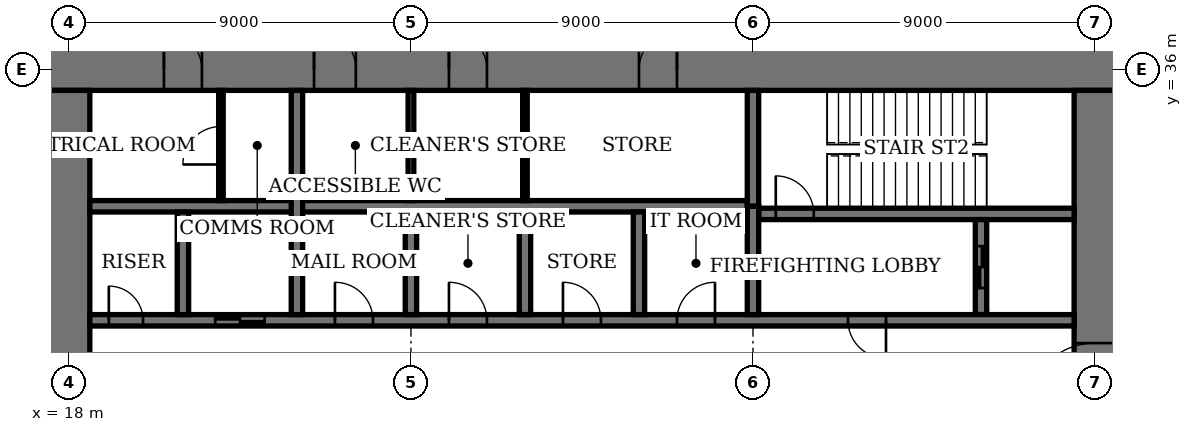
"""IFC4 building model, lengths in metres.
Left out: names, types, materials, properties, quantities, classifications, styles, units other than length and angle.
Written with IfcOpenShell. Run it as: python <this file> out.ifc"""

import sys

from ifc_helpers import new_model, si_unit, direction, frame, frame_2d, origin, place, context, subcontext, project, spatial, rectangle, extrude, element, fill, save


model = new_model("IFC4")
c1 = context("Model", 3, precision=1e-05, world=origin(), true_north=direction((0.0, 1.0)))
c2 = subcontext(c1, "Body", "Model", "MODEL_VIEW")
j1 = project(units=[si_unit("LENGTHUNIT", "METRE"), si_unit("PLANEANGLEUNIT", "RADIAN")], contexts=[c1])
p1 = place(None, origin())
s1 = spatial("IfcSite", under=j1, at=p1, CompositionType="ELEMENT")
p2 = place(p1, origin())
s2 = spatial("IfcBuilding", under=s1, at=p2, CompositionType="ELEMENT")
p3 = place(p2, frame((0.0, 0.0, 307.4)))
s3 = spatial("IfcBuildingStorey", under=s2, at=p3, CompositionType="ELEMENT", Elevation=307.4)
p4 = place(p3, frame((45.55, 36.0, 0.0), z_axis=(0.0, 0.0, 1.0), x_axis=(-1.0, 0.0, 0.0)))
e1 = element("IfcWall", 1, at=p4, inside=s3, PredefinedType="SHEAR", context=c2, shape_type="SweptSolid", body=[
    extrude(rectangle(XDim=28.1, YDim=1.1, at=frame_2d((14.05, 0.0))), origin(), (0.0, 0.0, 1.0), 4.4),
])
p5 = place(p4, frame((11.55, 0.0, 0.0)))
e2 = element("IfcOpeningElement", 2, at=p5, cuts=e1, PredefinedType="OPENING", context=c2, shape_type="SweptSolid", body=[
    extrude(rectangle(XDim=1.0, YDim=2.4, at=frame_2d((0.5, 1.2))), frame((0.0, 0.56, 0.0), z_axis=(0.0, -1.0, 0.0), x_axis=(1.0, 0.0, 0.0)), (0.0, 0.0, 1.0), 1.12),
])
p6 = place(p4, frame((16.55, 0.0, 0.0)))
e3 = element("IfcOpeningElement", 3, at=p6, cuts=e1, PredefinedType="OPENING", context=c2, shape_type="SweptSolid", body=[
    extrude(rectangle(XDim=1.0, YDim=2.4, at=frame_2d((0.5, 1.2))), frame((0.0, 0.56, 0.0), z_axis=(0.0, -1.0, 0.0), x_axis=(1.0, 0.0, 0.0)), (0.0, 0.0, 1.0), 1.12),
])
p7 = place(p4, frame((20.0, 0.0, 0.0)))
e4 = element("IfcOpeningElement", 4, at=p7, cuts=e1, PredefinedType="OPENING", context=c2, shape_type="SweptSolid", body=[
    extrude(rectangle(XDim=1.1, YDim=2.4, at=frame_2d((0.55, 1.2))), frame((0.0, 0.56, 0.0), z_axis=(0.0, -1.0, 0.0), x_axis=(1.0, 0.0, 0.0)), (0.0, 0.0, 1.0), 1.12),
])
p8 = place(p4, frame((24.05, 0.0, 0.0)))
e5 = element("IfcOpeningElement", 5, at=p8, cuts=e1, PredefinedType="OPENING", context=c2, shape_type="SweptSolid", body=[
    extrude(rectangle(XDim=1.0, YDim=2.4, at=frame_2d((0.5, 1.2))), frame((0.0, 0.56, 0.0), z_axis=(0.0, -1.0, 0.0), x_axis=(1.0, 0.0, 0.0)), (0.0, 0.0, 1.0), 1.12),
])
p9 = place(p3, frame((18.0, 35.45, 0.0), z_axis=(0.0, 0.0, 1.0), x_axis=(0.0, -1.0, 0.0)))
e6 = element("IfcWall", 6, at=p9, inside=s3, PredefinedType="SHEAR", context=c2, shape_type="SweptSolid", body=[
    extrude(rectangle(XDim=16.9, YDim=1.1, at=frame_2d((8.45, 0.0))), origin(), (0.0, 0.0, 1.0), 4.4),
])
p10 = place(p9, frame((8.45, 0.0, 0.0)))
e7 = element("IfcOpeningElement", 7, at=p10, cuts=e6, PredefinedType="OPENING", context=c2, shape_type="SweptSolid", body=[
    extrude(rectangle(XDim=1.8, YDim=2.4, at=frame_2d((0.9, 1.2))), frame((0.0, 0.56, 0.0), z_axis=(0.0, -1.0, 0.0), x_axis=(1.0, 0.0, 0.0)), (0.0, 0.0, 1.0), 1.12),
])
p11 = place(p3, frame((45.0, 18.55, 0.0), z_axis=(0.0, 0.0, 1.0), x_axis=(0.0, 1.0, 0.0)))
e8 = element("IfcWall", 8, at=p11, inside=s3, PredefinedType="SHEAR", context=c2, shape_type="SweptSolid", body=[
    extrude(rectangle(XDim=16.9, YDim=1.1, at=frame_2d((8.45, 0.0))), origin(), (0.0, 0.0, 1.0), 4.4),
])
p12 = place(p11, frame((8.45, 0.0, 0.0)))
e9 = element("IfcOpeningElement", 9, at=p12, cuts=e8, PredefinedType="OPENING", context=c2, shape_type="SweptSolid", body=[
    extrude(rectangle(XDim=1.8, YDim=2.4, at=frame_2d((0.9, 1.2))), frame((0.0, 0.56, 0.0), z_axis=(0.0, -1.0, 0.0), x_axis=(1.0, 0.0, 0.0)), (0.0, 0.0, 1.0), 1.12),
])
p13 = place(p3, frame((36.15, 32.2, 0.0), z_axis=(0.0, 0.0, 1.0), x_axis=(1.0, 0.0, 0.0)))
e10 = element("IfcWall", 10, at=p13, inside=s3, PredefinedType="SHEAR", context=c2, shape_type="SweptSolid", body=[
    extrude(rectangle(XDim=8.3, YDim=0.3, at=frame_2d((4.15, 0.0))), origin(), (0.0, 0.0, 1.0), 4.4),
])
p14 = place(p13, frame((0.45, 0.0, 0.0)))
e11 = element("IfcOpeningElement", 11, at=p14, cuts=e10, PredefinedType="OPENING", context=c2, shape_type="SweptSolid", body=[
    extrude(rectangle(XDim=1.0, YDim=2.4, at=frame_2d((0.5, 1.2))), frame((0.0, 0.16, 0.0), z_axis=(0.0, -1.0, 0.0), x_axis=(1.0, 0.0, 0.0)), (0.0, 0.0, 1.0), 0.32),
])
p15 = place(p3, frame((36.0, 32.4, 0.0), z_axis=(0.0, 0.0, 1.0), x_axis=(0.0, 1.0, 0.0)))
e12 = element("IfcWall", 12, at=p15, inside=s3, PredefinedType="SHEAR", context=c2, shape_type="SweptSolid", body=[
    extrude(rectangle(XDim=3.05, YDim=0.3, at=frame_2d((1.525, 0.0))), origin(), (0.0, 0.0, 1.0), 4.4),
])
p16 = place(p3, frame((42.0, 29.55, 0.0), z_axis=(0.0, 0.0, 1.0), x_axis=(0.0, 1.0, 0.0)))
e13 = element("IfcWall", 13, at=p16, inside=s3, PredefinedType="SHEAR", context=c2, shape_type="SweptSolid", body=[
    extrude(rectangle(XDim=2.5, YDim=0.3, at=frame_2d((1.25, 0.0))), origin(), (0.0, 0.0, 1.0), 4.4),
])
p17 = place(p16, frame((0.7, 0.0, 0.0)))
e14 = element("IfcOpeningElement", 14, at=p17, cuts=e13, PredefinedType="OPENING", context=c2, shape_type="SweptSolid", body=[
    extrude(rectangle(XDim=1.1, YDim=2.4, at=frame_2d((0.55, 1.2))), frame((0.0, 0.16, 0.0), z_axis=(0.0, -1.0, 0.0), x_axis=(1.0, 0.0, 0.0)), (0.0, 0.0, 1.0), 0.32),
])
p18 = place(p3, frame((18.55, 29.4, 0.0), z_axis=(0.0, 0.0, 1.0), x_axis=(1.0, 0.0, 0.0)))
e15 = element("IfcWall", 15, at=p18, inside=s3, PredefinedType="SHEAR", context=c2, shape_type="SweptSolid", body=[
    extrude(rectangle(XDim=25.9, YDim=0.3, at=frame_2d((12.95, 0.0))), origin(), (0.0, 0.0, 1.0), 4.4),
])
p19 = place(p18, frame((19.95, 0.0, 0.0)))
e16 = element("IfcOpeningElement", 16, at=p19, cuts=e15, PredefinedType="OPENING", context=c2, shape_type="SweptSolid", body=[
    extrude(rectangle(XDim=1.0, YDim=2.4, at=frame_2d((0.5, 1.2))), frame((0.0, 0.16, 0.0), z_axis=(0.0, -1.0, 0.0), x_axis=(1.0, 0.0, 0.0)), (0.0, 0.0, 1.0), 0.32),
])
p20 = place(p18, frame((0.5, 0.0, 0.0)))
e17 = element("IfcOpeningElement", 17, at=p20, cuts=e15, PredefinedType="OPENING", context=c2, shape_type="SweptSolid", body=[
    extrude(rectangle(XDim=0.9, YDim=2.1, at=frame_2d((0.45, 1.05))), frame((0.0, 0.16, 0.0), z_axis=(0.0, -1.0, 0.0), x_axis=(1.0, 0.0, 0.0)), (0.0, 0.0, 1.0), 0.32),
])
p21 = place(p18, frame((15.45, 0.0, 0.0)))
e18 = element("IfcOpeningElement", 18, at=p21, cuts=e15, PredefinedType="OPENING", context=c2, shape_type="SweptSolid", body=[
    extrude(rectangle(XDim=1.0, YDim=2.4, at=frame_2d((0.5, 1.2))), frame((0.0, 0.16, 0.0), z_axis=(0.0, -1.0, 0.0), x_axis=(1.0, 0.0, 0.0)), (0.0, 0.0, 1.0), 0.32),
])
p22 = place(p18, frame((12.45, 0.0, 0.0)))
e19 = element("IfcOpeningElement", 19, at=p22, cuts=e15, PredefinedType="OPENING", context=c2, shape_type="SweptSolid", body=[
    extrude(rectangle(XDim=1.0, YDim=2.4, at=frame_2d((0.5, 1.2))), frame((0.0, 0.16, 0.0), z_axis=(0.0, -1.0, 0.0), x_axis=(1.0, 0.0, 0.0)), (0.0, 0.0, 1.0), 0.32),
])
p23 = place(p18, frame((9.45, 0.0, 0.0)))
e20 = element("IfcOpeningElement", 20, at=p23, cuts=e15, PredefinedType="OPENING", context=c2, shape_type="SweptSolid", body=[
    extrude(rectangle(XDim=1.0, YDim=2.4, at=frame_2d((0.5, 1.2))), frame((0.0, 0.16, 0.0), z_axis=(0.0, -1.0, 0.0), x_axis=(1.0, 0.0, 0.0)), (0.0, 0.0, 1.0), 0.32),
])
p24 = place(p18, frame((6.45, 0.0, 0.0)))
e21 = element("IfcOpeningElement", 21, at=p24, cuts=e15, PredefinedType="OPENING", context=c2, shape_type="SweptSolid", body=[
    extrude(rectangle(XDim=1.0, YDim=2.4, at=frame_2d((0.5, 1.2))), frame((0.0, 0.16, 0.0), z_axis=(0.0, -1.0, 0.0), x_axis=(1.0, 0.0, 0.0)), (0.0, 0.0, 1.0), 0.32),
])
p25 = place(p18, frame((3.3, 0.0, 0.0)))
e22 = element("IfcOpeningElement", 22, at=p25, cuts=e15, PredefinedType="OPENING", context=c2, shape_type="SweptSolid", body=[
    extrude(rectangle(XDim=1.3, YDim=2.4, at=frame_2d((0.65, 1.2))), frame((0.0, 0.16, 0.0), z_axis=(0.0, -1.0, 0.0), x_axis=(1.0, 0.0, 0.0)), (0.0, 0.0, 1.0), 0.32),
])
p26 = place(p3, frame((18.55, 32.4, 0.0), z_axis=(0.0, 0.0, 1.0), x_axis=(1.0, 0.0, 0.0)))
e23 = element("IfcWall", 23, at=p26, inside=s3, PredefinedType="SHEAR", context=c2, shape_type="SweptSolid", body=[
    extrude(rectangle(XDim=17.3, YDim=0.3, at=frame_2d((8.65, 0.0))), origin(), (0.0, 0.0, 1.0), 4.4),
])
for number, where, z_axis, x_axis in (
    (24, (33.0, 29.55, 0.0), (0.0, 0.0, 1.0), (0.0, 1.0, 0.0)),
    (25, (30.0, 29.55, 0.0), (0.0, 0.0, 1.0), (0.0, 1.0, 0.0)),
    (26, (27.0, 29.55, 0.0), (0.0, 0.0, 1.0), (0.0, 1.0, 0.0)),
):
    element("IfcWall", number, at=place(p3, frame(where, z_axis=z_axis, x_axis=x_axis)), inside=s3, PredefinedType="SHEAR", context=c2, shape_type="SweptSolid", body=[
        extrude(rectangle(XDim=2.7, YDim=0.3, at=frame_2d((1.35, 0.0))), origin(), (0.0, 0.0, 1.0), 4.4),
    ])
p27 = place(p3, frame((24.0, 29.55, 0.0), z_axis=(0.0, 0.0, 1.0), x_axis=(0.0, 1.0, 0.0)))
e27 = element("IfcWall", 27, at=p27, inside=s3, PredefinedType="SHEAR", context=c2, shape_type="SweptSolid", body=[
    extrude(rectangle(XDim=5.9, YDim=0.3, at=frame_2d((2.95, 0.0))), origin(), (0.0, 0.0, 1.0), 4.4),
])
p28 = place(p3, frame((21.0, 29.55, 0.0), z_axis=(0.0, 0.0, 1.0), x_axis=(0.0, 1.0, 0.0)))
e28 = element("IfcWall", 28, at=p28, inside=s3, PredefinedType="SHEAR", context=c2, shape_type="SweptSolid", body=[
    extrude(rectangle(XDim=2.7, YDim=0.3, at=frame_2d((1.35, 0.0))), origin(), (0.0, 0.0, 1.0), 4.4),
])
p29 = place(p3, frame((36.0, 29.55, 0.0), z_axis=(0.0, 0.0, 1.0), x_axis=(0.0, 1.0, 0.0)))
e29 = element("IfcWall", 29, at=p29, inside=s3, PredefinedType="SHEAR", context=c2, shape_type="SweptSolid", body=[
    extrude(rectangle(XDim=2.85, YDim=0.3, at=frame_2d((1.425, 0.0))), origin(), (0.0, 0.0, 1.0), 4.4),
])
p30 = place(p3, frame((30.0, 32.55, 0.0), z_axis=(0.0, 0.0, 1.0), x_axis=(0.0, 1.0, 0.0)))
e30 = element("IfcWall", 30, at=p30, inside=s3, PredefinedType="PARTITIONING", context=c2, shape_type="SweptSolid", body=[
    extrude(rectangle(XDim=2.9, YDim=0.12, at=frame_2d((1.45, 0.0))), origin(), (0.0, 0.0, 1.0), 4.05),
])
p31 = place(p3, frame((27.0, 32.55, 0.0), z_axis=(0.0, 0.0, 1.0), x_axis=(0.0, 1.0, 0.0)))
e31 = element("IfcWall", 31, at=p31, inside=s3, PredefinedType="PARTITIONING", context=c2, shape_type="SweptSolid", body=[
    extrude(rectangle(XDim=2.9, YDim=0.15, at=frame_2d((1.45, 0.0))), origin(), (0.0, 0.0, 1.0), 4.05),
])
p32 = place(p3, frame((22.0, 32.55, 0.0), z_axis=(0.0, 0.0, 1.0), x_axis=(0.0, 1.0, 0.0)))
e32 = element("IfcWall", 32, at=p32, inside=s3, PredefinedType="PARTITIONING", context=c2, shape_type="SweptSolid", body=[
    extrude(rectangle(XDim=2.9, YDim=0.12, at=frame_2d((1.45, 0.0))), origin(), (0.0, 0.0, 1.0), 4.05),
])
p33 = place(p32, frame((0.95, 0.0, 0.0)))
e33 = element("IfcOpeningElement", 33, at=p33, cuts=e32, PredefinedType="OPENING", context=c2, shape_type="SweptSolid", body=[
    extrude(rectangle(XDim=1.0, YDim=2.4, at=frame_2d((0.5, 1.2))), frame((0.0, 0.07, 0.0), z_axis=(0.0, -1.0, 0.0), x_axis=(1.0, 0.0, 0.0)), (0.0, 0.0, 1.0), 0.14),
])
p34 = place(p12, origin())
e34 = element("IfcDoor", 34, at=p34, inside=s3, OperationType="DOUBLE_DOOR_DOUBLE_SWING", PredefinedType="DOOR", context=c2, shape_type="SweptSolid", body=[
    extrude(rectangle(XDim=1.8, YDim=2.4, at=frame_2d((0.9, 1.2))), frame((0.0, 0.03, 0.0), z_axis=(0.0, -1.0, 0.0), x_axis=(1.0, 0.0, 0.0)), (0.0, 0.0, 1.0), 0.06),
    extrude(rectangle(XDim=0.04, YDim=2.4, at=frame_2d((0.02, 1.2))), frame((0.0, 0.55, 0.0), z_axis=(0.0, -1.0, 0.0), x_axis=(1.0, 0.0, 0.0)), (0.0, 0.0, 1.0), 1.1),
    extrude(rectangle(XDim=0.04, YDim=2.4, at=frame_2d((1.78, 1.2))), frame((0.0, 0.55, 0.0), z_axis=(0.0, -1.0, 0.0), x_axis=(1.0, 0.0, 0.0)), (0.0, 0.0, 1.0), 1.1),
    extrude(rectangle(XDim=1.8, YDim=0.04, at=frame_2d((0.9, 2.38))), frame((0.0, 0.55, 0.0), z_axis=(0.0, -1.0, 0.0), x_axis=(1.0, 0.0, 0.0)), (0.0, 0.0, 1.0), 1.1),
])
fill(e9, e34)
p35 = place(p5, origin())
e35 = element("IfcDoor", 35, at=p35, inside=s3, OperationType="SINGLE_SWING_LEFT", PredefinedType="DOOR", context=c2, shape_type="SweptSolid", body=[
    extrude(rectangle(XDim=1.0, YDim=2.4, at=frame_2d((0.5, 1.2))), frame((0.0, 0.025, 0.0), z_axis=(0.0, -1.0, 0.0), x_axis=(1.0, 0.0, 0.0)), (0.0, 0.0, 1.0), 0.05),
    extrude(rectangle(XDim=0.04, YDim=2.4, at=frame_2d((0.02, 1.2))), frame((0.0, 0.4, 0.0), z_axis=(0.0, -1.0, 0.0), x_axis=(1.0, 0.0, 0.0)), (0.0, 0.0, 1.0), 0.8),
    extrude(rectangle(XDim=0.04, YDim=2.4, at=frame_2d((0.98, 1.2))), frame((0.0, 0.4, 0.0), z_axis=(0.0, -1.0, 0.0), x_axis=(1.0, 0.0, 0.0)), (0.0, 0.0, 1.0), 0.8),
    extrude(rectangle(XDim=1.0, YDim=0.04, at=frame_2d((0.5, 2.38))), frame((0.0, 0.4, 0.0), z_axis=(0.0, -1.0, 0.0), x_axis=(1.0, 0.0, 0.0)), (0.0, 0.0, 1.0), 0.8),
])
fill(e2, e35)
p36 = place(p6, origin())
e36 = element("IfcDoor", 36, at=p36, inside=s3, OperationType="SINGLE_SWING_RIGHT", PredefinedType="DOOR", context=c2, shape_type="SweptSolid", body=[
    extrude(rectangle(XDim=1.0, YDim=2.4, at=frame_2d((0.5, 1.2))), frame((0.0, 0.025, 0.0), z_axis=(0.0, -1.0, 0.0), x_axis=(1.0, 0.0, 0.0)), (0.0, 0.0, 1.0), 0.05),
    extrude(rectangle(XDim=0.04, YDim=2.4, at=frame_2d((0.02, 1.2))), frame((0.0, 0.4, 0.0), z_axis=(0.0, -1.0, 0.0), x_axis=(1.0, 0.0, 0.0)), (0.0, 0.0, 1.0), 0.8),
    extrude(rectangle(XDim=0.04, YDim=2.4, at=frame_2d((0.98, 1.2))), frame((0.0, 0.4, 0.0), z_axis=(0.0, -1.0, 0.0), x_axis=(1.0, 0.0, 0.0)), (0.0, 0.0, 1.0), 0.8),
    extrude(rectangle(XDim=1.0, YDim=0.04, at=frame_2d((0.5, 2.38))), frame((0.0, 0.4, 0.0), z_axis=(0.0, -1.0, 0.0), x_axis=(1.0, 0.0, 0.0)), (0.0, 0.0, 1.0), 0.8),
])
fill(e3, e36)
p37 = place(p7, origin())
e37 = element("IfcDoor", 37, at=p37, inside=s3, OperationType="SINGLE_SWING_RIGHT", PredefinedType="DOOR", context=c2, shape_type="SweptSolid", body=[
    extrude(rectangle(XDim=1.1, YDim=2.4, at=frame_2d((0.55, 1.2))), frame((0.0, 0.025, 0.0), z_axis=(0.0, -1.0, 0.0), x_axis=(1.0, 0.0, 0.0)), (0.0, 0.0, 1.0), 0.05),
    extrude(rectangle(XDim=0.04, YDim=2.4, at=frame_2d((0.02, 1.2))), frame((0.0, 0.44, 0.0), z_axis=(0.0, -1.0, 0.0), x_axis=(1.0, 0.0, 0.0)), (0.0, 0.0, 1.0), 0.88),
    extrude(rectangle(XDim=0.04, YDim=2.4, at=frame_2d((1.08, 1.2))), frame((0.0, 0.44, 0.0), z_axis=(0.0, -1.0, 0.0), x_axis=(1.0, 0.0, 0.0)), (0.0, 0.0, 1.0), 0.88),
    extrude(rectangle(XDim=1.1, YDim=0.04, at=frame_2d((0.55, 2.38))), frame((0.0, 0.44, 0.0), z_axis=(0.0, -1.0, 0.0), x_axis=(1.0, 0.0, 0.0)), (0.0, 0.0, 1.0), 0.88),
])
fill(e4, e37)
p38 = place(p8, origin())
e38 = element("IfcDoor", 38, at=p38, inside=s3, OperationType="SINGLE_SWING_RIGHT", PredefinedType="DOOR", context=c2, shape_type="SweptSolid", body=[
    extrude(rectangle(XDim=1.0, YDim=2.4, at=frame_2d((0.5, 1.2))), frame((0.0, 0.025, 0.0), z_axis=(0.0, -1.0, 0.0), x_axis=(1.0, 0.0, 0.0)), (0.0, 0.0, 1.0), 0.05),
    extrude(rectangle(XDim=0.04, YDim=2.4, at=frame_2d((0.02, 1.2))), frame((0.0, 0.4, 0.0), z_axis=(0.0, -1.0, 0.0), x_axis=(1.0, 0.0, 0.0)), (0.0, 0.0, 1.0), 0.8),
    extrude(rectangle(XDim=0.04, YDim=2.4, at=frame_2d((0.98, 1.2))), frame((0.0, 0.4, 0.0), z_axis=(0.0, -1.0, 0.0), x_axis=(1.0, 0.0, 0.0)), (0.0, 0.0, 1.0), 0.8),
    extrude(rectangle(XDim=1.0, YDim=0.04, at=frame_2d((0.5, 2.38))), frame((0.0, 0.4, 0.0), z_axis=(0.0, -1.0, 0.0), x_axis=(1.0, 0.0, 0.0)), (0.0, 0.0, 1.0), 0.8),
])
fill(e5, e38)
p39 = place(p14, origin())
e39 = element("IfcDoor", 39, at=p39, inside=s3, OperationType="SINGLE_SWING_RIGHT", PredefinedType="DOOR", context=c2, shape_type="SweptSolid", body=[
    extrude(rectangle(XDim=1.0, YDim=2.4, at=frame_2d((0.5, 1.2))), frame((0.0, 0.03, 0.0), z_axis=(0.0, -1.0, 0.0), x_axis=(1.0, 0.0, 0.0)), (0.0, 0.0, 1.0), 0.06),
])
fill(e11, e39)
p40 = place(p19, origin())
e40 = element("IfcDoor", 40, at=p40, inside=s3, OperationType="SINGLE_SWING_RIGHT", PredefinedType="DOOR", context=c2, shape_type="SweptSolid", body=[
    extrude(rectangle(XDim=1.0, YDim=2.4, at=frame_2d((0.5, 1.2))), frame((0.0, 0.03, 0.0), z_axis=(0.0, -1.0, 0.0), x_axis=(1.0, 0.0, 0.0)), (0.0, 0.0, 1.0), 0.06),
])
fill(e16, e40)
p41 = place(p20, origin())
e41 = element("IfcDoor", 41, at=p41, inside=s3, OperationType="SINGLE_SWING_RIGHT", PredefinedType="DOOR", context=c2, shape_type="SweptSolid", body=[
    extrude(rectangle(XDim=0.9, YDim=2.1, at=frame_2d((0.45, 1.05))), frame((0.0, 0.03, 0.0), z_axis=(0.0, -1.0, 0.0), x_axis=(1.0, 0.0, 0.0)), (0.0, 0.0, 1.0), 0.06),
])
fill(e17, e41)
p42 = place(p33, origin())
e42 = element("IfcDoor", 42, at=p42, inside=s3, OperationType="SINGLE_SWING_RIGHT", PredefinedType="DOOR", context=c2, shape_type="SweptSolid", body=[
    extrude(rectangle(XDim=1.0, YDim=2.4, at=frame_2d((0.5, 1.2))), frame((0.0, 0.03, 0.0), z_axis=(0.0, -1.0, 0.0), x_axis=(1.0, 0.0, 0.0)), (0.0, 0.0, 1.0), 0.06),
])
fill(e33, e42)
p43 = place(p21, origin())
e43 = element("IfcDoor", 43, at=p43, inside=s3, OperationType="SINGLE_SWING_LEFT", PredefinedType="DOOR", context=c2, shape_type="SweptSolid", body=[
    extrude(rectangle(XDim=1.0, YDim=2.4, at=frame_2d((0.5, 1.2))), frame((0.0, 0.03, 0.0), z_axis=(0.0, -1.0, 0.0), x_axis=(1.0, 0.0, 0.0)), (0.0, 0.0, 1.0), 0.06),
])
fill(e18, e43)
p44 = place(p22, origin())
e44 = element("IfcDoor", 44, at=p44, inside=s3, OperationType="SINGLE_SWING_RIGHT", PredefinedType="DOOR", context=c2, shape_type="SweptSolid", body=[
    extrude(rectangle(XDim=1.0, YDim=2.4, at=frame_2d((0.5, 1.2))), frame((0.0, 0.03, 0.0), z_axis=(0.0, -1.0, 0.0), x_axis=(1.0, 0.0, 0.0)), (0.0, 0.0, 1.0), 0.06),
])
fill(e19, e44)
p45 = place(p23, origin())
e45 = element("IfcDoor", 45, at=p45, inside=s3, OperationType="SINGLE_SWING_RIGHT", PredefinedType="DOOR", context=c2, shape_type="SweptSolid", body=[
    extrude(rectangle(XDim=1.0, YDim=2.4, at=frame_2d((0.5, 1.2))), frame((0.0, 0.03, 0.0), z_axis=(0.0, -1.0, 0.0), x_axis=(1.0, 0.0, 0.0)), (0.0, 0.0, 1.0), 0.06),
])
fill(e20, e45)
p46 = place(p24, origin())
e46 = element("IfcDoor", 46, at=p46, inside=s3, OperationType="SINGLE_SWING_RIGHT", PredefinedType="DOOR", context=c2, shape_type="SweptSolid", body=[
    extrude(rectangle(XDim=1.0, YDim=2.4, at=frame_2d((0.5, 1.2))), frame((0.0, 0.03, 0.0), z_axis=(0.0, -1.0, 0.0), x_axis=(1.0, 0.0, 0.0)), (0.0, 0.0, 1.0), 0.06),
])
fill(e21, e46)
p47 = place(p25, origin())
e47 = element("IfcDoor", 47, at=p47, inside=s3, OperationType="DOUBLE_DOOR_SLIDING", PredefinedType="DOOR", context=c2, shape_type="SweptSolid", body=[
    extrude(rectangle(XDim=1.3, YDim=2.4, at=frame_2d((0.65, 1.2))), frame((0.0, 0.02, 0.0), z_axis=(0.0, -1.0, 0.0), x_axis=(1.0, 0.0, 0.0)), (0.0, 0.0, 1.0), 0.04),
])
fill(e22, e47)
p48 = place(p17, origin())
e48 = element("IfcDoor", 48, at=p48, inside=s3, OperationType="DOUBLE_DOOR_SLIDING", PredefinedType="DOOR", context=c2, shape_type="SweptSolid", body=[
    extrude(rectangle(XDim=1.1, YDim=2.4, at=frame_2d((0.55, 1.2))), frame((0.0, 0.03, 0.0), z_axis=(0.0, -1.0, 0.0), x_axis=(1.0, 0.0, 0.0)), (0.0, 0.0, 1.0), 0.06),
])
fill(e14, e48)
save(model, sys.argv[1])
